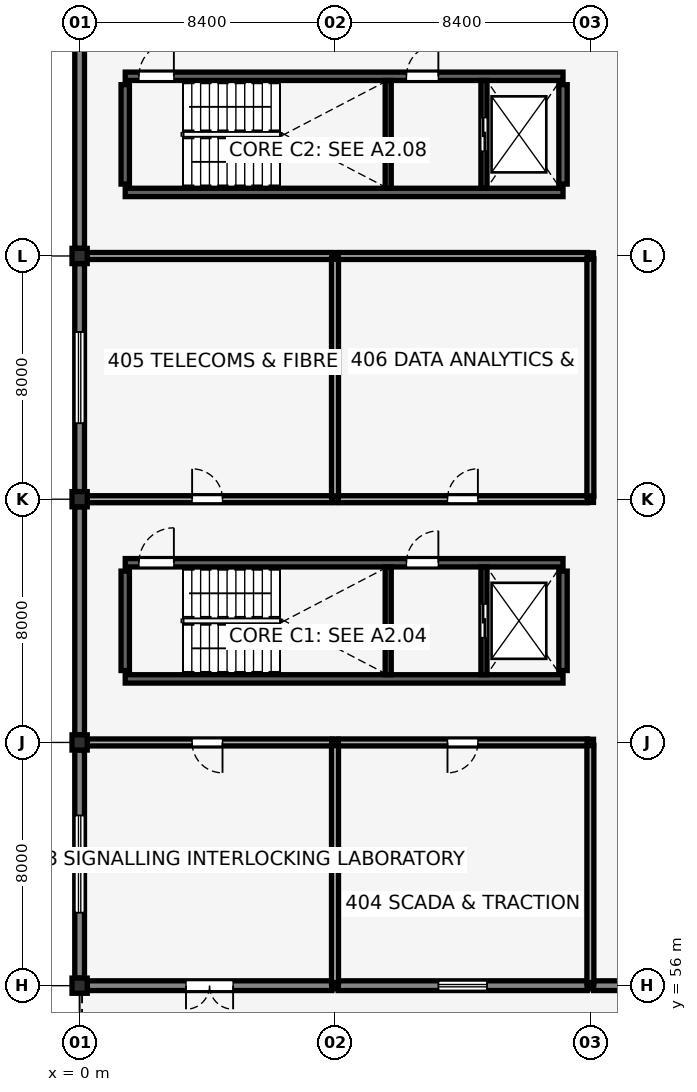
"""IFC4 building model, lengths in metres.
Left out: names, types, materials, properties, quantities, classifications, styles, units other than length and angle.
Written with IfcOpenShell. Run it as: python <this file> out.ifc"""

import sys

from ifc_helpers import new_model, si_unit, direction, frame, frame_2d, origin, origin_2d, place, context, subcontext, project, spatial, rectangle, i_section, extrude, element, fill, save


model = new_model("IFC4")
c1 = context("Model", 3, precision=1e-05, world=origin(), true_north=direction((0.0, 1.0)))
c2 = subcontext(c1, "Body", "Model", "MODEL_VIEW")
j1 = project(units=[si_unit("LENGTHUNIT", "METRE"), si_unit("PLANEANGLEUNIT", "RADIAN")], contexts=[c1])
p1 = place(None, origin())
s1 = spatial("IfcSite", under=j1, at=p1, CompositionType="ELEMENT")
p2 = place(p1, origin())
s2 = spatial("IfcBuilding", under=s1, at=p2, CompositionType="ELEMENT")
p3 = place(p2, frame((0.0, 0.0, 17.2)))
s3 = spatial("IfcBuildingStorey", under=s2, at=p3, CompositionType="ELEMENT", Elevation=17.2)
p4 = place(p3, frame((1.5, 66.09, 0.0), z_axis=(0.0, 0.0, 1.0), x_axis=(1.0, 0.0, 0.0)))
e1 = element("IfcWall", 1, at=p4, inside=s3, PredefinedType="SHEAR", context=c2, shape_type="SweptSolid", body=[
    extrude(rectangle(XDim=14.4, YDim=0.275, at=frame_2d((7.2, 0.0))), origin(), (0.0, 0.0, 1.0), 3.59),
])
p5 = place(p3, frame((1.5, 69.91, 0.0), z_axis=(0.0, 0.0, 1.0), x_axis=(1.0, 0.0, 0.0)))
e2 = element("IfcWall", 2, at=p5, inside=s3, PredefinedType="SHEAR", context=c2, shape_type="SweptSolid", body=[
    extrude(rectangle(XDim=14.4, YDim=0.275, at=frame_2d((7.2, 0.0))), origin(), (0.0, 0.0, 1.0), 3.59),
])
p6 = place(p5, frame((0.45, 0.0, 0.0), z_axis=(0.0, 0.0, 1.0), x_axis=(1.0, 0.0, 0.0)))
e3 = element("IfcOpeningElement", 3, at=p6, cuts=e2, PredefinedType="OPENING", context=c2, shape_type="SweptSolid", body=[
    extrude(rectangle(XDim=1.15, YDim=2.15, at=frame_2d((0.575, 1.075))), frame((0.0, 0.147, 0.0), z_axis=(0.0, -1.0, 0.0), x_axis=(1.0, 0.0, 0.0)), (0.0, 0.0, 1.0), 0.295),
])
p7 = place(p5, frame((9.25, 0.0, 0.0), z_axis=(0.0, 0.0, 1.0), x_axis=(1.0, 0.0, 0.0)))
e4 = element("IfcOpeningElement", 4, at=p7, cuts=e2, PredefinedType="OPENING", context=c2, shape_type="SweptSolid", body=[
    extrude(rectangle(XDim=1.05, YDim=2.15, at=frame_2d((0.525, 1.075))), frame((0.0, 0.147, 0.0), z_axis=(0.0, -1.0, 0.0), x_axis=(1.0, 0.0, 0.0)), (0.0, 0.0, 1.0), 0.295),
])
for number, where, z_axis, x_axis in (
    (5, (1.5, 66.365, 0.0), (0.0, 0.0, 1.0), (0.0, 1.0, 0.0)),
    (6, (15.9, 66.365, 0.0), (0.0, 0.0, 1.0), (0.0, 1.0, 0.0)),
):
    element("IfcWall", number, at=place(p3, frame(where, z_axis=z_axis, x_axis=x_axis)), inside=s3, PredefinedType="SHEAR", context=c2, shape_type="SweptSolid", body=[
        extrude(rectangle(XDim=3.27, YDim=0.275, at=frame_2d((1.635, 0.0))), origin(), (0.0, 0.0, 1.0), 3.59),
    ])
p8 = place(p3, frame((1.5, 82.09, 0.0), z_axis=(0.0, 0.0, 1.0), x_axis=(1.0, 0.0, 0.0)))
e7 = element("IfcWall", 7, at=p8, inside=s3, PredefinedType="SHEAR", context=c2, shape_type="SweptSolid", body=[
    extrude(rectangle(XDim=14.4, YDim=0.275, at=frame_2d((7.2, 0.0))), origin(), (0.0, 0.0, 1.0), 3.59),
])
p9 = place(p3, frame((1.5, 85.91, 0.0), z_axis=(0.0, 0.0, 1.0), x_axis=(1.0, 0.0, 0.0)))
e8 = element("IfcWall", 8, at=p9, inside=s3, PredefinedType="SHEAR", context=c2, shape_type="SweptSolid", body=[
    extrude(rectangle(XDim=14.4, YDim=0.275, at=frame_2d((7.2, 0.0))), origin(), (0.0, 0.0, 1.0), 3.59),
])
p10 = place(p9, frame((0.45, 0.0, 0.0), z_axis=(0.0, 0.0, 1.0), x_axis=(1.0, 0.0, 0.0)))
e9 = element("IfcOpeningElement", 9, at=p10, cuts=e8, PredefinedType="OPENING", context=c2, shape_type="SweptSolid", body=[
    extrude(rectangle(XDim=1.15, YDim=2.15, at=frame_2d((0.575, 1.075))), frame((0.0, 0.147, 0.0), z_axis=(0.0, -1.0, 0.0), x_axis=(1.0, 0.0, 0.0)), (0.0, 0.0, 1.0), 0.295),
])
p11 = place(p9, frame((9.25, 0.0, 0.0), z_axis=(0.0, 0.0, 1.0), x_axis=(1.0, 0.0, 0.0)))
e10 = element("IfcOpeningElement", 10, at=p11, cuts=e8, PredefinedType="OPENING", context=c2, shape_type="SweptSolid", body=[
    extrude(rectangle(XDim=1.05, YDim=2.15, at=frame_2d((0.525, 1.075))), frame((0.0, 0.147, 0.0), z_axis=(0.0, -1.0, 0.0), x_axis=(1.0, 0.0, 0.0)), (0.0, 0.0, 1.0), 0.295),
])
for number, where, z_axis, x_axis in (
    (11, (1.5, 82.365, 0.0), (0.0, 0.0, 1.0), (0.0, 1.0, 0.0)),
    (12, (15.9, 82.365, 0.0), (0.0, 0.0, 1.0), (0.0, 1.0, 0.0)),
):
    element("IfcWall", number, at=place(p3, frame(where, z_axis=z_axis, x_axis=x_axis)), inside=s3, PredefinedType="SHEAR", context=c2, shape_type="SweptSolid", body=[
        extrude(rectangle(XDim=3.27, YDim=0.275, at=frame_2d((1.635, 0.0))), origin(), (0.0, 0.0, 1.0), 3.59),
    ])
for number, where, z_axis, x_axis in (
    (13, (0.0, 56.0, 0.0), (0.0, 0.0, 1.0), (1.0, 0.0, 0.0)),
    (14, (0.0, 64.0, 0.0), (0.0, 0.0, 1.0), (1.0, 0.0, 0.0)),
    (15, (0.0, 72.0, 0.0), (0.0, 0.0, 1.0), (1.0, 0.0, 0.0)),
    (16, (0.0, 80.0, 0.0), (0.0, 0.0, 1.0), (1.0, 0.0, 0.0)),
):
    element("IfcColumn", number, at=place(p3, frame(where, z_axis=z_axis, x_axis=x_axis)), inside=s3, PredefinedType="COLUMN", context=c2, shape_type="SweptSolid", body=[
        extrude(rectangle(XDim=0.5, YDim=0.5, at=origin_2d()), origin(), (0.0, 0.0, 1.0), 3.59),
    ])
for number, where, z_axis, x_axis in (
    (17, (8.4, 56.0, 0.0), (0.0, 0.0, 1.0), (1.0, 0.0, 0.0)),
    (18, (8.4, 64.0, 0.0), (0.0, 0.0, 1.0), (1.0, 0.0, 0.0)),
    (19, (8.4, 72.0, 0.0), (0.0, 0.0, 1.0), (1.0, 0.0, 0.0)),
    (20, (8.4, 80.0, 0.0), (0.0, 0.0, 1.0), (1.0, 0.0, 0.0)),
    (21, (16.8, 56.0, 0.0), (0.0, 0.0, 1.0), (1.0, 0.0, 0.0)),
    (22, (16.8, 64.0, 0.0), (0.0, 0.0, 1.0), (1.0, 0.0, 0.0)),
    (23, (16.8, 72.0, 0.0), (0.0, 0.0, 1.0), (1.0, 0.0, 0.0)),
    (24, (16.8, 80.0, 0.0), (0.0, 0.0, 1.0), (1.0, 0.0, 0.0)),
):
    element("IfcColumn", number, at=place(p3, frame(where, z_axis=z_axis, x_axis=x_axis)), inside=s3, PredefinedType="COLUMN", context=c2, shape_type="SweptSolid", body=[
        extrude(i_section(OverallWidth=0.206, OverallDepth=0.21, WebThickness=0.01, FlangeThickness=0.014, FilletRadius=0.01, at=origin_2d()), origin(), (0.0, 0.0, 1.0), 3.59),
    ])
p12 = place(p3, frame((0.25, 56.0, 0.0), z_axis=(0.0, 0.0, 1.0), x_axis=(1.0, 0.0, 0.0)))
e25 = element("IfcWall", 25, at=p12, inside=s3, PredefinedType="SOLIDWALL", context=c2, shape_type="SweptSolid", body=[
    extrude(rectangle(XDim=8.047, YDim=0.32, at=frame_2d((4.023, 0.0))), origin(), (0.0, 0.0, 1.0), 3.33),
])
p13 = place(p12, frame((4.799, 0.0, 0.0), z_axis=(0.0, 0.0, 1.0), x_axis=(-1.0, 0.0, 0.0)))
e26 = element("IfcOpeningElement", 26, at=p13, cuts=e25, PredefinedType="OPENING", context=c2, shape_type="SweptSolid", body=[
    extrude(rectangle(XDim=1.55, YDim=2.2, at=frame_2d((0.775, 1.1))), frame((0.0, 0.17, 0.0), z_axis=(0.0, -1.0, 0.0), x_axis=(1.0, 0.0, 0.0)), (0.0, 0.0, 1.0), 0.34),
])
p14 = place(p3, frame((8.503, 56.0, 0.0), z_axis=(0.0, 0.0, 1.0), x_axis=(1.0, 0.0, 0.0)))
e27 = element("IfcWall", 27, at=p14, inside=s3, PredefinedType="SOLIDWALL", context=c2, shape_type="SweptSolid", body=[
    extrude(rectangle(XDim=8.194, YDim=0.32, at=frame_2d((4.097, 0.0))), origin(), (0.0, 0.0, 1.0), 3.33),
])
p15 = place(p14, frame((3.297, 0.0, 0.9), z_axis=(0.0, 0.0, 1.0), x_axis=(1.0, 0.0, 0.0)))
e28 = element("IfcOpeningElement", 28, at=p15, cuts=e27, PredefinedType="OPENING", context=c2, shape_type="SweptSolid", body=[
    extrude(rectangle(XDim=1.6, YDim=1.2, at=frame_2d((0.8, 0.6))), frame((0.0, 0.17, 0.0), z_axis=(0.0, -1.0, 0.0), x_axis=(1.0, 0.0, 0.0)), (0.0, 0.0, 1.0), 0.34),
])
p16 = place(p3, frame((16.903, 56.0, 0.0), z_axis=(0.0, 0.0, 1.0), x_axis=(1.0, 0.0, 0.0)))
e29 = element("IfcWall", 29, at=p16, inside=s3, PredefinedType="SOLIDWALL", context=c2, shape_type="SweptSolid", body=[
    extrude(rectangle(XDim=8.194, YDim=0.32, at=frame_2d((4.097, 0.0))), origin(), (0.0, 0.0, 1.0), 3.33),
])
p17 = place(p16, frame((2.297, 0.0, 0.9), z_axis=(0.0, 0.0, 1.0), x_axis=(1.0, 0.0, 0.0)))
e30 = element("IfcOpeningElement", 30, at=p17, cuts=e29, PredefinedType="OPENING", context=c2, shape_type="SweptSolid", body=[
    extrude(rectangle(XDim=3.6, YDim=1.8, at=frame_2d((1.8, 0.9))), frame((0.0, 0.17, 0.0), z_axis=(0.0, -1.0, 0.0), x_axis=(1.0, 0.0, 0.0)), (0.0, 0.0, 1.0), 0.34),
])
p18 = place(p3, frame((0.0, 56.25, 0.0), z_axis=(0.0, 0.0, 1.0), x_axis=(0.0, 1.0, 0.0)))
e31 = element("IfcWall", 31, at=p18, inside=s3, PredefinedType="SOLIDWALL", context=c2, shape_type="SweptSolid", body=[
    extrude(rectangle(XDim=7.5, YDim=0.32, at=frame_2d((3.75, 0.0))), origin(), (0.0, 0.0, 1.0), 3.29),
])
p19 = place(p18, frame((2.15, 0.0, 0.9), z_axis=(0.0, 0.0, 1.0), x_axis=(1.0, 0.0, 0.0)))
e32 = element("IfcOpeningElement", 32, at=p19, cuts=e31, PredefinedType="OPENING", context=c2, shape_type="SweptSolid", body=[
    extrude(rectangle(XDim=3.2, YDim=1.65, at=frame_2d((1.6, 0.825))), frame((0.0, 0.17, 0.0), z_axis=(0.0, -1.0, 0.0), x_axis=(1.0, 0.0, 0.0)), (0.0, 0.0, 1.0), 0.34),
])
p20 = place(p3, frame((0.0, 64.25, 0.0), z_axis=(0.0, 0.0, 1.0), x_axis=(0.0, 1.0, 0.0)))
e33 = element("IfcWall", 33, at=p20, inside=s3, PredefinedType="SOLIDWALL", context=c2, shape_type="SweptSolid", body=[
    extrude(rectangle(XDim=7.5, YDim=0.32, at=frame_2d((3.75, 0.0))), origin(), (0.0, 0.0, 1.0), 3.29),
])
p21 = place(p3, frame((0.0, 72.25, 0.0), z_axis=(0.0, 0.0, 1.0), x_axis=(0.0, 1.0, 0.0)))
e34 = element("IfcWall", 34, at=p21, inside=s3, PredefinedType="SOLIDWALL", context=c2, shape_type="SweptSolid", body=[
    extrude(rectangle(XDim=7.5, YDim=0.32, at=frame_2d((3.75, 0.0))), origin(), (0.0, 0.0, 1.0), 3.29),
])
p22 = place(p21, frame((2.25, 0.0, 0.9), z_axis=(0.0, 0.0, 1.0), x_axis=(1.0, 0.0, 0.0)))
e35 = element("IfcOpeningElement", 35, at=p22, cuts=e34, PredefinedType="OPENING", context=c2, shape_type="SweptSolid", body=[
    extrude(rectangle(XDim=3.0, YDim=1.65, at=frame_2d((1.5, 0.825))), frame((0.0, 0.17, 0.0), z_axis=(0.0, -1.0, 0.0), x_axis=(1.0, 0.0, 0.0)), (0.0, 0.0, 1.0), 0.34),
])
p23 = place(p3, frame((0.0, 80.25, 0.0), z_axis=(0.0, 0.0, 1.0), x_axis=(0.0, 1.0, 0.0)))
e36 = element("IfcWall", 36, at=p23, inside=s3, PredefinedType="SOLIDWALL", context=c2, shape_type="SweptSolid", body=[
    extrude(rectangle(XDim=7.5, YDim=0.32, at=frame_2d((3.75, 0.0))), origin(), (0.0, 0.0, 1.0), 3.29),
])
p24 = place(p3, frame((10.15, 66.228, 0.0), z_axis=(0.0, 0.0, 1.0), x_axis=(0.0, 1.0, 0.0)))
e37 = element("IfcWall", 37, at=p24, inside=s3, PredefinedType="SHEAR", context=c2, shape_type="SweptSolid", body=[
    extrude(rectangle(XDim=3.545, YDim=0.2, at=frame_2d((1.772, 0.0))), origin(), (0.0, 0.0, 1.0), 3.59),
])
p25 = place(p3, frame((13.3, 66.228, 0.0), z_axis=(0.0, 0.0, 1.0), x_axis=(0.0, 1.0, 0.0)))
e38 = element("IfcWall", 38, at=p25, inside=s3, PredefinedType="SHEAR", context=c2, shape_type="SweptSolid", body=[
    extrude(rectangle(XDim=3.545, YDim=0.2, at=frame_2d((1.772, 0.0))), origin(), (0.0, 0.0, 1.0), 3.59),
])
p26 = place(p25, frame((1.222, 0.0, 0.0), z_axis=(0.0, 0.0, 1.0), x_axis=(1.0, 0.0, 0.0)))
e39 = element("IfcOpeningElement", 39, at=p26, cuts=e38, PredefinedType="OPENING", context=c2, shape_type="SweptSolid", body=[
    extrude(rectangle(XDim=1.1, YDim=2.15, at=frame_2d((0.55, 1.075))), frame((0.0, 0.11, 0.0), z_axis=(0.0, -1.0, 0.0), x_axis=(1.0, 0.0, 0.0)), (0.0, 0.0, 1.0), 0.22),
])
p27 = place(p3, frame((10.15, 82.228, 0.0), z_axis=(0.0, 0.0, 1.0), x_axis=(0.0, 1.0, 0.0)))
e40 = element("IfcWall", 40, at=p27, inside=s3, PredefinedType="SHEAR", context=c2, shape_type="SweptSolid", body=[
    extrude(rectangle(XDim=3.545, YDim=0.2, at=frame_2d((1.772, 0.0))), origin(), (0.0, 0.0, 1.0), 3.59),
])
p28 = place(p3, frame((13.3, 82.228, 0.0), z_axis=(0.0, 0.0, 1.0), x_axis=(0.0, 1.0, 0.0)))
e41 = element("IfcWall", 41, at=p28, inside=s3, PredefinedType="SHEAR", context=c2, shape_type="SweptSolid", body=[
    extrude(rectangle(XDim=3.545, YDim=0.2, at=frame_2d((1.772, 0.0))), origin(), (0.0, 0.0, 1.0), 3.59),
])
p29 = place(p28, frame((1.222, 0.0, 0.0), z_axis=(0.0, 0.0, 1.0), x_axis=(1.0, 0.0, 0.0)))
e42 = element("IfcOpeningElement", 42, at=p29, cuts=e41, PredefinedType="OPENING", context=c2, shape_type="SweptSolid", body=[
    extrude(rectangle(XDim=1.1, YDim=2.15, at=frame_2d((0.55, 1.075))), frame((0.0, 0.11, 0.0), z_axis=(0.0, -1.0, 0.0), x_axis=(1.0, 0.0, 0.0)), (0.0, 0.0, 1.0), 0.22),
])
p30 = place(p3, frame((0.24, 64.0, 0.0), z_axis=(0.0, 0.0, 1.0), x_axis=(1.0, 0.0, 0.0)))
e43 = element("IfcWall", 43, at=p30, inside=s3, PredefinedType="PARTITIONING", context=c2, shape_type="SweptSolid", body=[
    extrude(rectangle(XDim=8.067, YDim=0.23, at=frame_2d((4.034, 0.0))), origin(), (0.0, 0.0, 1.0), 3.137),
])
p31 = place(p30, frame((4.46, 0.0, 0.0), z_axis=(0.0, 0.0, 1.0), x_axis=(-1.0, 0.0, 0.0)))
e44 = element("IfcOpeningElement", 44, at=p31, cuts=e43, PredefinedType="OPENING", context=c2, shape_type="SweptSolid", body=[
    extrude(rectangle(XDim=1.0, YDim=2.15, at=frame_2d((0.5, 1.075))), frame((0.0, 0.125, 0.0), z_axis=(0.0, -1.0, 0.0), x_axis=(1.0, 0.0, 0.0)), (0.0, 0.0, 1.0), 0.25),
])
p32 = place(p3, frame((8.493, 64.0, 0.0), z_axis=(0.0, 0.0, 1.0), x_axis=(1.0, 0.0, 0.0)))
e45 = element("IfcWall", 45, at=p32, inside=s3, PredefinedType="PARTITIONING", context=c2, shape_type="SweptSolid", body=[
    extrude(rectangle(XDim=8.214, YDim=0.23, at=frame_2d((4.107, 0.0))), origin(), (0.0, 0.0, 1.0), 3.137),
])
p33 = place(p32, frame((4.607, 0.0, 0.0), z_axis=(0.0, 0.0, 1.0), x_axis=(-1.0, 0.0, 0.0)))
e46 = element("IfcOpeningElement", 46, at=p33, cuts=e45, PredefinedType="OPENING", context=c2, shape_type="SweptSolid", body=[
    extrude(rectangle(XDim=1.0, YDim=2.15, at=frame_2d((0.5, 1.075))), frame((0.0, 0.125, 0.0), z_axis=(0.0, -1.0, 0.0), x_axis=(1.0, 0.0, 0.0)), (0.0, 0.0, 1.0), 0.25),
])
p34 = place(p3, frame((0.24, 72.0, 0.0), z_axis=(0.0, 0.0, 1.0), x_axis=(1.0, 0.0, 0.0)))
e47 = element("IfcWall", 47, at=p34, inside=s3, PredefinedType="PARTITIONING", context=c2, shape_type="SweptSolid", body=[
    extrude(rectangle(XDim=8.067, YDim=0.23, at=frame_2d((4.034, 0.0))), origin(), (0.0, 0.0, 1.0), 3.137),
])
p35 = place(p34, frame((3.46, 0.0, 0.0), z_axis=(0.0, 0.0, 1.0), x_axis=(1.0, 0.0, 0.0)))
e48 = element("IfcOpeningElement", 48, at=p35, cuts=e47, PredefinedType="OPENING", context=c2, shape_type="SweptSolid", body=[
    extrude(rectangle(XDim=1.0, YDim=2.15, at=frame_2d((0.5, 1.075))), frame((0.0, 0.125, 0.0), z_axis=(0.0, -1.0, 0.0), x_axis=(1.0, 0.0, 0.0)), (0.0, 0.0, 1.0), 0.25),
])
p36 = place(p3, frame((8.493, 72.0, 0.0), z_axis=(0.0, 0.0, 1.0), x_axis=(1.0, 0.0, 0.0)))
e49 = element("IfcWall", 49, at=p36, inside=s3, PredefinedType="PARTITIONING", context=c2, shape_type="SweptSolid", body=[
    extrude(rectangle(XDim=8.214, YDim=0.23, at=frame_2d((4.107, 0.0))), origin(), (0.0, 0.0, 1.0), 3.137),
])
p37 = place(p36, frame((3.607, 0.0, 0.0), z_axis=(0.0, 0.0, 1.0), x_axis=(1.0, 0.0, 0.0)))
e50 = element("IfcOpeningElement", 50, at=p37, cuts=e49, PredefinedType="OPENING", context=c2, shape_type="SweptSolid", body=[
    extrude(rectangle(XDim=1.0, YDim=2.15, at=frame_2d((0.5, 1.075))), frame((0.0, 0.125, 0.0), z_axis=(0.0, -1.0, 0.0), x_axis=(1.0, 0.0, 0.0)), (0.0, 0.0, 1.0), 0.25),
])
for number, where, z_axis, x_axis in (
    (51, (8.4, 56.095, 0.0), (0.0, 0.0, 1.0), (0.0, 1.0, 0.0)),
    (52, (16.8, 56.095, 0.0), (0.0, 0.0, 1.0), (0.0, 1.0, 0.0)),
):
    element("IfcWall", number, at=place(p3, frame(where, z_axis=z_axis, x_axis=x_axis)), inside=s3, PredefinedType="PARTITIONING", context=c2, shape_type="SweptSolid", body=[
        extrude(rectangle(XDim=7.811, YDim=0.23, at=frame_2d((3.905, 0.0))), origin(), (0.0, 0.0, 1.0), 3.137),
    ])
p38 = place(p3, frame((0.24, 80.0, 0.0), z_axis=(0.0, 0.0, 1.0), x_axis=(1.0, 0.0, 0.0)))
e53 = element("IfcWall", 53, at=p38, inside=s3, PredefinedType="PARTITIONING", context=c2, shape_type="SweptSolid", body=[
    extrude(rectangle(XDim=8.067, YDim=0.23, at=frame_2d((4.034, 0.0))), origin(), (0.0, 0.0, 1.0), 3.137),
])
p39 = place(p3, frame((8.4, 72.095, 0.0), z_axis=(0.0, 0.0, 1.0), x_axis=(0.0, 1.0, 0.0)))
e54 = element("IfcWall", 54, at=p39, inside=s3, PredefinedType="PARTITIONING", context=c2, shape_type="SweptSolid", body=[
    extrude(rectangle(XDim=7.811, YDim=0.23, at=frame_2d((3.905, 0.0))), origin(), (0.0, 0.0, 1.0), 3.137),
])
p40 = place(p3, frame((8.493, 80.0, 0.0), z_axis=(0.0, 0.0, 1.0), x_axis=(1.0, 0.0, 0.0)))
e55 = element("IfcWall", 55, at=p40, inside=s3, PredefinedType="PARTITIONING", context=c2, shape_type="SweptSolid", body=[
    extrude(rectangle(XDim=8.214, YDim=0.23, at=frame_2d((4.107, 0.0))), origin(), (0.0, 0.0, 1.0), 3.137),
])
p41 = place(p3, frame((16.8, 72.095, 0.0), z_axis=(0.0, 0.0, 1.0), x_axis=(0.0, 1.0, 0.0)))
e56 = element("IfcWall", 56, at=p41, inside=s3, PredefinedType="PARTITIONING", context=c2, shape_type="SweptSolid", body=[
    extrude(rectangle(XDim=7.811, YDim=0.23, at=frame_2d((3.905, 0.0))), origin(), (0.0, 0.0, 1.0), 3.137),
])
p42 = place(p13, origin())
e57 = element("IfcDoor", 57, at=p42, inside=s3, OperationType="DOUBLE_DOOR_SINGLE_SWING", PredefinedType="DOOR", context=c2, shape_type="SweptSolid", body=[
    extrude(rectangle(XDim=1.55, YDim=2.2, at=frame_2d((0.775, 1.1))), frame((0.0, 0.025, 0.0), z_axis=(0.0, -1.0, 0.0), x_axis=(1.0, 0.0, 0.0)), (0.0, 0.0, 1.0), 0.05),
])
fill(e26, e57)
p43 = place(p15, origin())
e58 = element("IfcWindow", 58, at=p43, inside=s3, PartitioningType="DOUBLE_PANEL_VERTICAL", PredefinedType="WINDOW", context=c2, shape_type="SweptSolid", body=[
    extrude(rectangle(XDim=1.6, YDim=1.2, at=frame_2d((0.8, 0.6))), frame((0.0, 0.03, 0.0), z_axis=(0.0, -1.0, 0.0), x_axis=(1.0, 0.0, 0.0)), (0.0, 0.0, 1.0), 0.06),
])
fill(e28, e58)
p44 = place(p19, origin())
e59 = element("IfcWindow", 59, at=p44, inside=s3, PartitioningType="TRIPLE_PANEL_VERTICAL", PredefinedType="WINDOW", context=c2, shape_type="SweptSolid", body=[
    extrude(rectangle(XDim=3.2, YDim=1.65, at=frame_2d((1.6, 0.825))), frame((0.0, 0.03, 0.0), z_axis=(0.0, -1.0, 0.0), x_axis=(1.0, 0.0, 0.0)), (0.0, 0.0, 1.0), 0.06),
])
fill(e32, e59)
p45 = place(p22, origin())
e60 = element("IfcWindow", 60, at=p45, inside=s3, PartitioningType="DOUBLE_PANEL_VERTICAL", PredefinedType="WINDOW", context=c2, shape_type="SweptSolid", body=[
    extrude(rectangle(XDim=3.0, YDim=1.65, at=frame_2d((1.5, 0.825))), frame((0.0, 0.03, 0.0), z_axis=(0.0, -1.0, 0.0), x_axis=(1.0, 0.0, 0.0)), (0.0, 0.0, 1.0), 0.06),
])
fill(e35, e60)
p46 = place(p6, origin())
e61 = element("IfcDoor", 61, at=p46, inside=s3, OperationType="SINGLE_SWING_RIGHT", PredefinedType="DOOR", context=c2, shape_type="SweptSolid", body=[
    extrude(rectangle(XDim=1.15, YDim=2.15, at=frame_2d((0.575, 1.075))), frame((0.0, 0.025, 0.0), z_axis=(0.0, -1.0, 0.0), x_axis=(1.0, 0.0, 0.0)), (0.0, 0.0, 1.0), 0.05),
])
fill(e3, e61)
p47 = place(p7, origin())
e62 = element("IfcDoor", 62, at=p47, inside=s3, OperationType="SINGLE_SWING_RIGHT", PredefinedType="DOOR", context=c2, shape_type="SweptSolid", body=[
    extrude(rectangle(XDim=1.05, YDim=2.15, at=frame_2d((0.525, 1.075))), frame((0.0, 0.025, 0.0), z_axis=(0.0, -1.0, 0.0), x_axis=(1.0, 0.0, 0.0)), (0.0, 0.0, 1.0), 0.05),
])
fill(e4, e62)
p48 = place(p26, origin())
e63 = element("IfcDoor", 63, at=p48, inside=s3, OperationType="DOUBLE_DOOR_SLIDING", PredefinedType="DOOR", context=c2, shape_type="SweptSolid", body=[
    extrude(rectangle(XDim=1.1, YDim=2.15, at=frame_2d((0.55, 1.075))), frame((0.0, 0.025, 0.0), z_axis=(0.0, -1.0, 0.0), x_axis=(1.0, 0.0, 0.0)), (0.0, 0.0, 1.0), 0.05),
])
fill(e39, e63)
p49 = place(p10, origin())
e64 = element("IfcDoor", 64, at=p49, inside=s3, OperationType="SINGLE_SWING_RIGHT", PredefinedType="DOOR", context=c2, shape_type="SweptSolid", body=[
    extrude(rectangle(XDim=1.15, YDim=2.15, at=frame_2d((0.575, 1.075))), frame((0.0, 0.025, 0.0), z_axis=(0.0, -1.0, 0.0), x_axis=(1.0, 0.0, 0.0)), (0.0, 0.0, 1.0), 0.05),
])
fill(e9, e64)
p50 = place(p11, origin())
e65 = element("IfcDoor", 65, at=p50, inside=s3, OperationType="SINGLE_SWING_RIGHT", PredefinedType="DOOR", context=c2, shape_type="SweptSolid", body=[
    extrude(rectangle(XDim=1.05, YDim=2.15, at=frame_2d((0.525, 1.075))), frame((0.0, 0.025, 0.0), z_axis=(0.0, -1.0, 0.0), x_axis=(1.0, 0.0, 0.0)), (0.0, 0.0, 1.0), 0.05),
])
fill(e10, e65)
p51 = place(p29, origin())
e66 = element("IfcDoor", 66, at=p51, inside=s3, OperationType="DOUBLE_DOOR_SLIDING", PredefinedType="DOOR", context=c2, shape_type="SweptSolid", body=[
    extrude(rectangle(XDim=1.1, YDim=2.15, at=frame_2d((0.55, 1.075))), frame((0.0, 0.025, 0.0), z_axis=(0.0, -1.0, 0.0), x_axis=(1.0, 0.0, 0.0)), (0.0, 0.0, 1.0), 0.05),
])
fill(e42, e66)
p52 = place(p31, origin())
e67 = element("IfcDoor", 67, at=p52, inside=s3, OperationType="SINGLE_SWING_LEFT", PredefinedType="DOOR", context=c2, shape_type="SweptSolid", body=[
    extrude(rectangle(XDim=1.0, YDim=2.15, at=frame_2d((0.5, 1.075))), frame((0.0, 0.025, 0.0), z_axis=(0.0, -1.0, 0.0), x_axis=(1.0, 0.0, 0.0)), (0.0, 0.0, 1.0), 0.05),
])
fill(e44, e67)
p53 = place(p33, origin())
e68 = element("IfcDoor", 68, at=p53, inside=s3, OperationType="SINGLE_SWING_RIGHT", PredefinedType="DOOR", context=c2, shape_type="SweptSolid", body=[
    extrude(rectangle(XDim=1.0, YDim=2.15, at=frame_2d((0.5, 1.075))), frame((0.0, 0.025, 0.0), z_axis=(0.0, -1.0, 0.0), x_axis=(1.0, 0.0, 0.0)), (0.0, 0.0, 1.0), 0.05),
])
fill(e46, e68)
p54 = place(p35, origin())
e69 = element("IfcDoor", 69, at=p54, inside=s3, OperationType="SINGLE_SWING_LEFT", PredefinedType="DOOR", context=c2, shape_type="SweptSolid", body=[
    extrude(rectangle(XDim=1.0, YDim=2.15, at=frame_2d((0.5, 1.075))), frame((0.0, 0.025, 0.0), z_axis=(0.0, -1.0, 0.0), x_axis=(1.0, 0.0, 0.0)), (0.0, 0.0, 1.0), 0.05),
])
fill(e48, e69)
p55 = place(p37, origin())
e70 = element("IfcDoor", 70, at=p55, inside=s3, OperationType="SINGLE_SWING_RIGHT", PredefinedType="DOOR", context=c2, shape_type="SweptSolid", body=[
    extrude(rectangle(XDim=1.0, YDim=2.15, at=frame_2d((0.5, 1.075))), frame((0.0, 0.025, 0.0), z_axis=(0.0, -1.0, 0.0), x_axis=(1.0, 0.0, 0.0)), (0.0, 0.0, 1.0), 0.05),
])
fill(e50, e70)
save(model, sys.argv[1])
